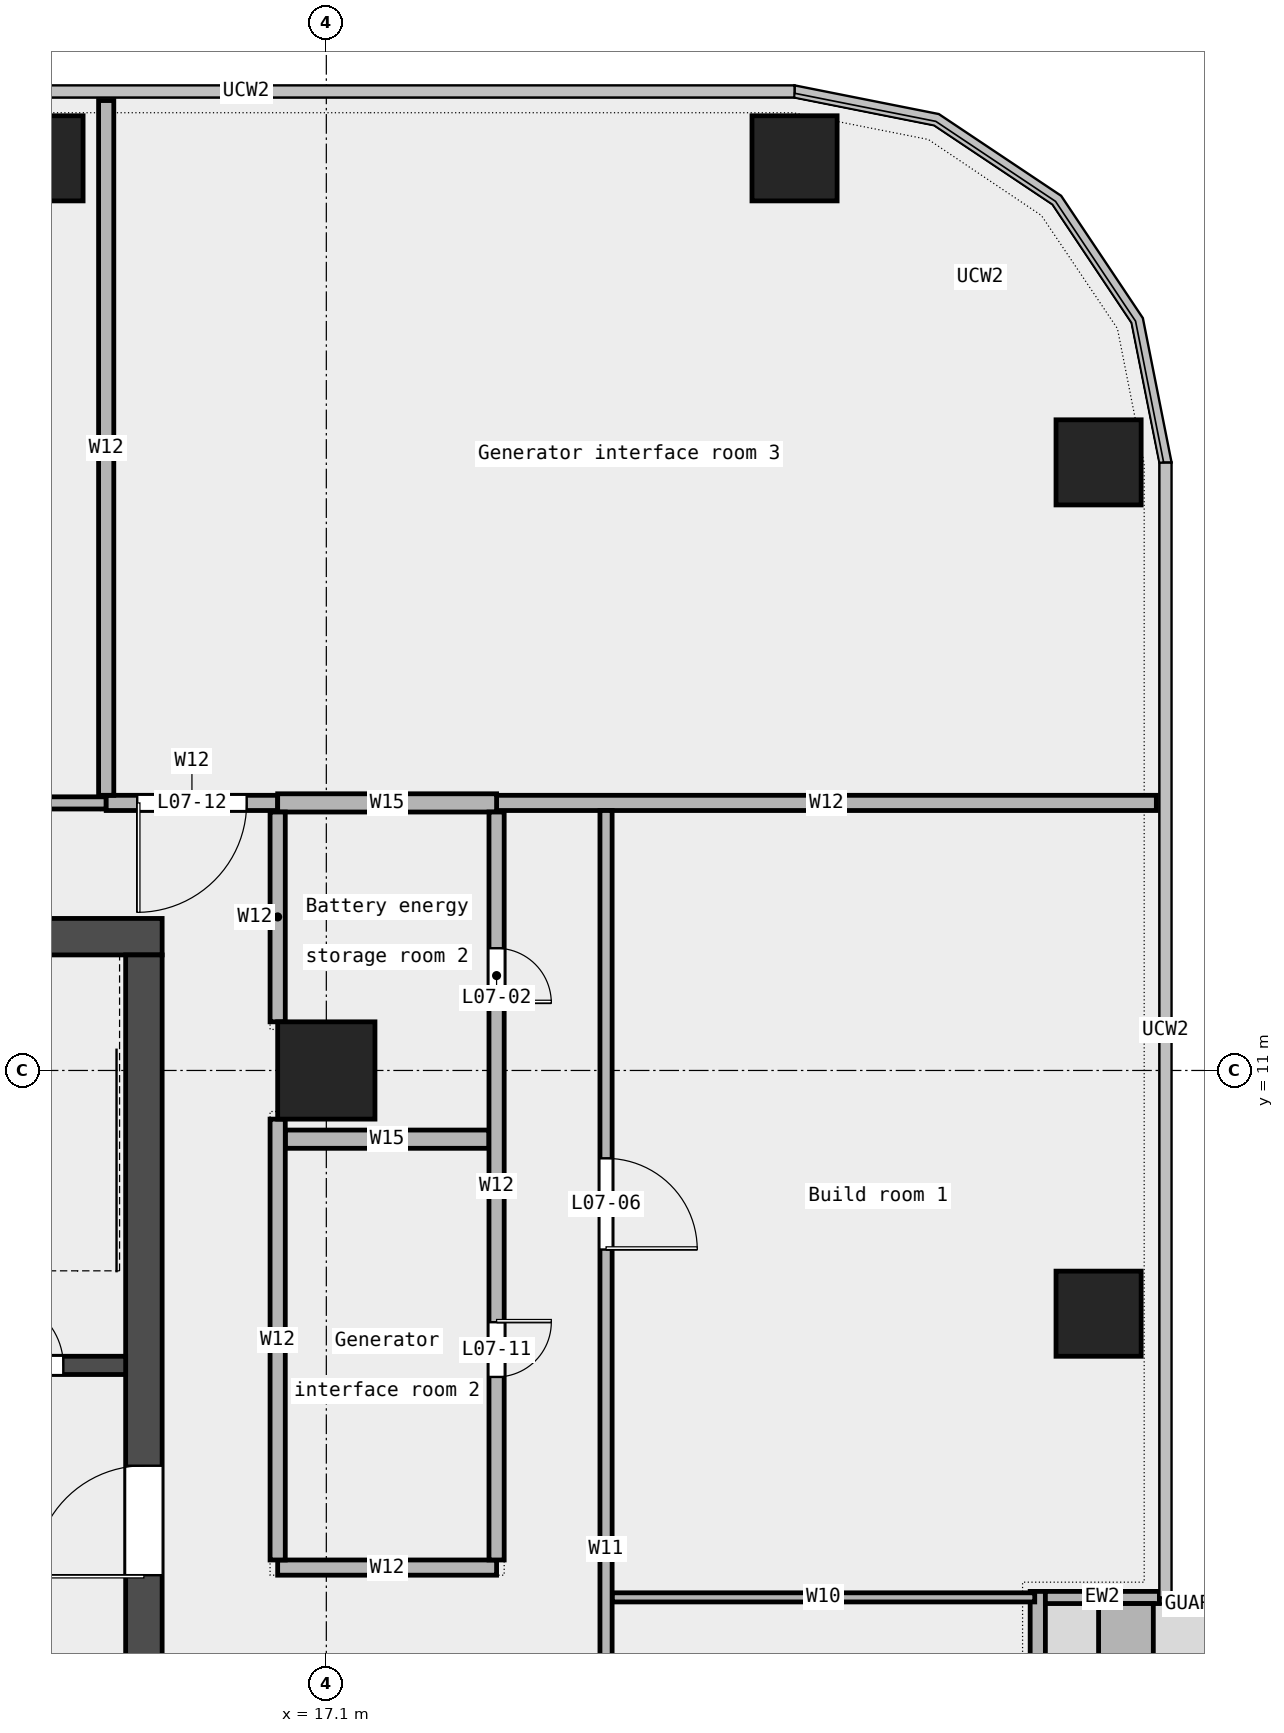
"""IFC4 building model, lengths in metres.
Left out: names, types, materials, properties, quantities, classifications, styles, units other than length and angle.
Written with IfcOpenShell. Run it as: python <this file> out.ifc"""

import sys

from ifc_helpers import new_model, si_unit, direction, frame, frame_2d, origin, origin_2d, place, context, subcontext, project, spatial, rectangle, extrude, element, fill, save


model = new_model("IFC4")
c1 = context("Model", 3, precision=1e-05, world=origin(), true_north=direction((0.0, 1.0)))
c2 = subcontext(c1, "Body", "Model", "MODEL_VIEW")
j1 = project(units=[si_unit("LENGTHUNIT", "METRE"), si_unit("PLANEANGLEUNIT", "RADIAN")], contexts=[c1])
p1 = place(None, origin())
s1 = spatial("IfcSite", under=j1, at=p1, CompositionType="ELEMENT")
p2 = place(p1, origin())
s2 = spatial("IfcBuilding", under=s1, at=p2, CompositionType="ELEMENT")
p3 = place(p2, frame((0.0, 0.0, 40.6)))
s3 = spatial("IfcBuildingStorey", under=s2, at=p3, CompositionType="ELEMENT", Elevation=40.6)
for number, where, z_axis, x_axis in (
    (1, (29.8, 7.0, 0.0), (0.0, 0.0, 1.0), (1.0, 0.0, 0.0)),
    (2, (29.8, 21.0, 0.0), (0.0, 0.0, 1.0), (1.0, 0.0, 0.0)),
    (3, (24.8, 26.0, 0.0), (0.0, 0.0, 1.0), (1.0, 0.0, 0.0)),
    (4, (12.4, 26.0, 0.0), (0.0, 0.0, 1.0), (1.0, 0.0, 0.0)),
):
    element("IfcColumn", number, at=place(p3, frame(where, z_axis=z_axis, x_axis=x_axis)), inside=s3, PredefinedType="COLUMN", context=c2, shape_type="SweptSolid", body=[
        extrude(rectangle(XDim=1.4, YDim=1.4, at=origin_2d()), origin(), (0.0, 0.0, 1.0), 4.35),
    ])
p4 = place(p3, frame((17.1, 11.0, 0.0), z_axis=(0.0, 0.0, 1.0), x_axis=(1.0, 0.0, 0.0)))
e5 = element("IfcColumn", 5, at=p4, inside=s3, PredefinedType="COLUMN", context=c2, shape_type="SweptSolid", body=[
    extrude(rectangle(XDim=1.6, YDim=1.6, at=origin_2d()), origin(), (0.0, 0.0, 1.0), 4.35),
])
p5 = place(p3, frame((28.8, -11.767, 0.0), z_axis=(0.0, 0.0, 1.0), x_axis=(0.0, 1.0, 0.0)))
e6 = element("IfcWall", 6, at=p5, inside=s3, PredefinedType="STANDARD", context=c2, shape_type="SweptSolid", body=[
    extrude(rectangle(XDim=14.2, YDim=0.25, at=frame_2d((7.1, 0.0))), origin(), (0.0, 0.0, 1.0), 4.35),
])
p6 = place(p5, frame((1.75, 0.0, 0.45)))
e7 = element("IfcOpeningElement", 7, at=p6, cuts=e6, PredefinedType="OPENING", context=c2, shape_type="SweptSolid", body=[
    extrude(rectangle(XDim=1.5, YDim=3.0, at=frame_2d((0.75, 1.5))), frame((0.0, 0.137, 0.0), z_axis=(0.0, -1.0, 0.0), x_axis=(1.0, 0.0, 0.0)), (0.0, 0.0, 1.0), 0.274),
])
p7 = place(p5, frame((6.25, 0.0, 0.0)))
e8 = element("IfcOpeningElement", 8, at=p7, cuts=e6, PredefinedType="OPENING", context=c2, shape_type="SweptSolid", body=[
    extrude(rectangle(XDim=1.8, YDim=2.4, at=frame_2d((0.9, 1.2))), frame((0.0, 0.137, 0.0), z_axis=(0.0, -1.0, 0.0), x_axis=(1.0, 0.0, 0.0)), (0.0, 0.0, 1.0), 0.274),
])
p8 = place(p5, frame((11.0, 0.0, 0.45)))
e9 = element("IfcOpeningElement", 9, at=p8, cuts=e6, PredefinedType="OPENING", context=c2, shape_type="SweptSolid", body=[
    extrude(rectangle(XDim=1.5, YDim=3.0, at=frame_2d((0.75, 1.5))), frame((0.0, 0.137, 0.0), z_axis=(0.0, -1.0, 0.0), x_axis=(1.0, 0.0, 0.0)), (0.0, 0.0, 1.0), 0.274),
])
p9 = place(p3, frame((30.8, 2.333, 0.0), z_axis=(0.0, 0.0, 1.0), x_axis=(-1.0, 0.0, 0.0)))
e10 = element("IfcWall", 10, at=p9, inside=s3, PredefinedType="STANDARD", context=c2, shape_type="SweptSolid", body=[
    extrude(rectangle(XDim=1.875, YDim=0.2, at=frame_2d((0.938, 0.0))), origin(), (0.0, 0.0, 1.0), 4.35),
])
p10 = place(p3, frame((30.25, -1.367, 0.0), z_axis=(0.0, 0.0, 1.0), x_axis=(0.0, 1.0, 0.0)))
e11 = element("IfcWall", 11, at=p10, inside=s3, PredefinedType="STANDARD", context=c2, shape_type="SweptSolid", body=[
    extrude(rectangle(XDim=3.6, YDim=0.9, at=frame_2d((1.8, 0.0))), origin(), (0.0, 0.0, 1.0), 0.7),
])
p11 = place(p3, frame((21.8, 2.335, 0.0), z_axis=(0.0, 0.0, 1.0), x_axis=(1.0, 0.0, 0.0)))
e12 = element("IfcWall", 12, at=p11, inside=s3, PredefinedType="PARTITIONING", context=c2, shape_type="SweptSolid", body=[
    extrude(rectangle(XDim=6.95, YDim=0.15, at=frame_2d((3.475, 0.0))), origin(), (0.0, 0.0, 1.0), 4.35),
])
p12 = place(p3, frame((16.3, 2.825, 0.0), z_axis=(0.0, 0.0, 1.0), x_axis=(1.0, 0.0, 0.0)))
e13 = element("IfcWall", 13, at=p12, inside=s3, PredefinedType="PARTITIONING", context=c2, shape_type="SweptSolid", body=[
    extrude(rectangle(XDim=3.6, YDim=0.25, at=frame_2d((1.8, 0.0))), origin(), (0.0, 0.0, 1.0), 4.35),
])
p13 = place(p3, frame((16.425, 9.87, 0.0), z_axis=(0.0, 0.0, 1.0), x_axis=(1.0, 0.0, 0.0)))
e14 = element("IfcWall", 14, at=p13, inside=s3, PredefinedType="PARTITIONING", context=c2, shape_type="SweptSolid", body=[
    extrude(rectangle(XDim=3.35, YDim=0.3, at=frame_2d((1.675, 0.0))), origin(), (0.0, 0.0, 1.0), 4.35),
])
p14 = place(p3, frame((-6.765, 15.4, 0.0), z_axis=(0.0, 0.0, 1.0), x_axis=(1.0, 0.0, 0.0)))
e15 = element("IfcWall", 15, at=p14, inside=s3, PredefinedType="PARTITIONING", context=c2, shape_type="SweptSolid", body=[
    extrude(rectangle(XDim=20.245, YDim=0.2, at=frame_2d((10.123, 0.0))), origin(), (0.0, 0.0, 1.0), 4.35),
])
p15 = place(p14, frame((6.015, 0.0, 0.0)))
e16 = element("IfcOpeningElement", 16, at=p15, cuts=e15, PredefinedType="OPENING", context=c2, shape_type="SweptSolid", body=[
    extrude(rectangle(XDim=1.5, YDim=2.1, at=frame_2d((0.75, 1.05))), frame((0.0, 0.112, 0.0), z_axis=(0.0, -1.0, 0.0), x_axis=(1.0, 0.0, 0.0)), (0.0, 0.0, 1.0), 0.224),
])
p16 = place(p14, frame((16.288, 0.0, 0.0)))
e17 = element("IfcOpeningElement", 17, at=p16, cuts=e15, PredefinedType="OPENING", context=c2, shape_type="SweptSolid", body=[
    extrude(rectangle(XDim=1.2, YDim=2.1, at=frame_2d((0.6, 1.05))), frame((0.0, 0.112, 0.0), z_axis=(0.0, -1.0, 0.0), x_axis=(1.0, 0.0, 0.0)), (0.0, 0.0, 1.0), 0.224),
])
p17 = place(p3, frame((13.48, 15.4, 0.0), z_axis=(0.0, 0.0, 1.0), x_axis=(1.0, 0.0, 0.0)))
e18 = element("IfcWall", 18, at=p17, inside=s3, PredefinedType="PARTITIONING", context=c2, shape_type="SweptSolid", body=[
    extrude(rectangle(XDim=2.82, YDim=0.25, at=frame_2d((1.41, 0.0))), origin(), (0.0, 0.0, 1.0), 4.35),
])
p18 = place(p17, frame((0.51, 0.0, 0.0)))
e19 = element("IfcOpeningElement", 19, at=p18, cuts=e18, PredefinedType="OPENING", context=c2, shape_type="SweptSolid", body=[
    extrude(rectangle(XDim=1.8, YDim=2.1, at=frame_2d((0.9, 1.05))), frame((0.0, 0.137, 0.0), z_axis=(0.0, -1.0, 0.0), x_axis=(1.0, 0.0, 0.0)), (0.0, 0.0, 1.0), 0.274),
])
p19 = place(p3, frame((19.9, 15.4, 0.0), z_axis=(0.0, 0.0, 1.0), x_axis=(1.0, 0.0, 0.0)))
e20 = element("IfcWall", 20, at=p19, inside=s3, PredefinedType="PARTITIONING", context=c2, shape_type="SweptSolid", body=[
    extrude(rectangle(XDim=10.85, YDim=0.25, at=frame_2d((5.425, 0.0))), origin(), (0.0, 0.0, 1.0), 4.35),
])
p20 = place(p3, frame((16.3, 15.4, 0.0), z_axis=(0.0, 0.0, 1.0), x_axis=(1.0, 0.0, 0.0)))
e21 = element("IfcWall", 21, at=p20, inside=s3, PredefinedType="PARTITIONING", context=c2, shape_type="SweptSolid", body=[
    extrude(rectangle(XDim=3.6, YDim=0.3, at=frame_2d((1.8, 0.0))), origin(), (0.0, 0.0, 1.0), 4.35),
])
p21 = place(p3, frame((13.48, 15.525, 0.0), z_axis=(0.0, 0.0, 1.0), x_axis=(0.0, 1.0, 0.0)))
e22 = element("IfcWall", 22, at=p21, inside=s3, PredefinedType="PARTITIONING", context=c2, shape_type="SweptSolid", body=[
    extrude(rectangle(XDim=11.425, YDim=0.25, at=frame_2d((5.712, 0.0))), origin(), (0.0, 0.0, 1.0), 4.35),
])
p22 = place(p3, frame((16.3, 2.95, 0.0), z_axis=(0.0, 0.0, 1.0), x_axis=(0.0, 1.0, 0.0)))
e23 = element("IfcWall", 23, at=p22, inside=s3, PredefinedType="PARTITIONING", context=c2, shape_type="SweptSolid", body=[
    extrude(rectangle(XDim=7.25, YDim=0.25, at=frame_2d((3.625, 0.0))), origin(), (0.0, 0.0, 1.0), 4.35),
])
p23 = place(p3, frame((16.3, 11.8, 0.0), z_axis=(0.0, 0.0, 1.0), x_axis=(0.0, 1.0, 0.0)))
e24 = element("IfcWall", 24, at=p23, inside=s3, PredefinedType="PARTITIONING", context=c2, shape_type="SweptSolid", body=[
    extrude(rectangle(XDim=3.45, YDim=0.25, at=frame_2d((1.725, 0.0))), origin(), (0.0, 0.0, 1.0), 4.35),
])
p24 = place(p3, frame((19.9, 2.95, 0.0), z_axis=(0.0, 0.0, 1.0), x_axis=(0.0, 1.0, 0.0)))
e25 = element("IfcWall", 25, at=p24, inside=s3, PredefinedType="PARTITIONING", context=c2, shape_type="SweptSolid", body=[
    extrude(rectangle(XDim=12.3, YDim=0.25, at=frame_2d((6.15, 0.0))), origin(), (0.0, 0.0, 1.0), 4.35),
])
p25 = place(p24, frame((9.16, 0.0, 0.0)))
e26 = element("IfcOpeningElement", 26, at=p25, cuts=e25, PredefinedType="OPENING", context=c2, shape_type="SweptSolid", body=[
    extrude(rectangle(XDim=0.9, YDim=2.1, at=frame_2d((0.45, 1.05))), frame((0.0, 0.137, 0.0), z_axis=(0.0, -1.0, 0.0), x_axis=(1.0, 0.0, 0.0)), (0.0, 0.0, 1.0), 0.274),
])
p26 = place(p24, frame((3.01, 0.0, 0.0)))
e27 = element("IfcOpeningElement", 27, at=p26, cuts=e25, PredefinedType="OPENING", context=c2, shape_type="SweptSolid", body=[
    extrude(rectangle(XDim=0.9, YDim=2.1, at=frame_2d((0.45, 1.05))), frame((0.0, 0.137, 0.0), z_axis=(0.0, -1.0, 0.0), x_axis=(1.0, 0.0, 0.0)), (0.0, 0.0, 1.0), 0.274),
])
p27 = place(p3, frame((21.7, -9.0, 0.0), z_axis=(0.0, 0.0, 1.0), x_axis=(0.0, 1.0, 0.0)))
e28 = element("IfcWall", 28, at=p27, inside=s3, PredefinedType="PARTITIONING", context=c2, shape_type="SweptSolid", body=[
    extrude(rectangle(XDim=24.275, YDim=0.2, at=frame_2d((12.137, 0.0))), origin(), (0.0, 0.0, 1.0), 4.35),
])
p28 = place(p27, frame((4.768, 0.0, 0.0)))
e29 = element("IfcOpeningElement", 29, at=p28, cuts=e28, PredefinedType="OPENING", context=c2, shape_type="SweptSolid", body=[
    extrude(rectangle(XDim=1.8, YDim=2.1, at=frame_2d((0.9, 1.05))), frame((0.0, 0.112, 0.0), z_axis=(0.0, -1.0, 0.0), x_axis=(1.0, 0.0, 0.0)), (0.0, 0.0, 1.0), 0.224),
])
p29 = place(p27, frame((17.055, 0.0, 0.0)))
e30 = element("IfcOpeningElement", 30, at=p29, cuts=e28, PredefinedType="OPENING", context=c2, shape_type="SweptSolid", body=[
    extrude(rectangle(XDim=1.5, YDim=2.1, at=frame_2d((0.75, 1.05))), frame((0.0, 0.112, 0.0), z_axis=(0.0, -1.0, 0.0), x_axis=(1.0, 0.0, 0.0)), (0.0, 0.0, 1.0), 0.224),
])
p30 = place(p3, frame((-14.4, 13.2, 0.0), z_axis=(0.0, 0.0, 1.0), x_axis=(1.0, 0.0, 0.0)))
e31 = element("IfcWall", 31, at=p30, inside=s3, PredefinedType="SHEAR", context=c2, shape_type="SweptSolid", body=[
    extrude(rectangle(XDim=28.8, YDim=0.6, at=frame_2d((14.4, 0.0))), origin(), (0.0, 0.0, 1.0), 4.5),
])
p31 = place(p30, frame((6.4, 0.0, 0.0)))
e32 = element("IfcOpeningElement", 32, at=p31, cuts=e31, PredefinedType="OPENING", context=c2, shape_type="SweptSolid", body=[
    extrude(rectangle(XDim=1.0, YDim=2.1, at=frame_2d((0.5, 1.05))), frame((0.0, 0.312, 0.0), z_axis=(0.0, -1.0, 0.0), x_axis=(1.0, 0.0, 0.0)), (0.0, 0.0, 1.0), 0.624),
])
p32 = place(p30, frame((11.462, 0.0, 0.0)))
e33 = element("IfcOpeningElement", 33, at=p32, cuts=e31, PredefinedType="OPENING", context=c2, shape_type="SweptSolid", body=[
    extrude(rectangle(XDim=1.0, YDim=2.1, at=frame_2d((0.5, 1.05))), frame((0.0, 0.312, 0.0), z_axis=(0.0, -1.0, 0.0), x_axis=(1.0, 0.0, 0.0)), (0.0, 0.0, 1.0), 0.624),
])
p33 = place(p30, frame((16.337, 0.0, 0.0)))
e34 = element("IfcOpeningElement", 34, at=p33, cuts=e31, PredefinedType="OPENING", context=c2, shape_type="SweptSolid", body=[
    extrude(rectangle(XDim=1.0, YDim=2.1, at=frame_2d((0.5, 1.05))), frame((0.0, 0.312, 0.0), z_axis=(0.0, -1.0, 0.0), x_axis=(1.0, 0.0, 0.0)), (0.0, 0.0, 1.0), 0.624),
])
p34 = place(p30, frame((21.775, 0.0, 0.0)))
e35 = element("IfcOpeningElement", 35, at=p34, cuts=e31, PredefinedType="OPENING", context=c2, shape_type="SweptSolid", body=[
    extrude(rectangle(XDim=1.0, YDim=2.1, at=frame_2d((0.5, 1.05))), frame((0.0, 0.312, 0.0), z_axis=(0.0, -1.0, 0.0), x_axis=(1.0, 0.0, 0.0)), (0.0, 0.0, 1.0), 0.624),
])
p35 = place(p3, frame((14.1, -6.6, 0.0), z_axis=(0.0, 0.0, 1.0), x_axis=(0.0, 1.0, 0.0)))
e36 = element("IfcWall", 36, at=p35, inside=s3, PredefinedType="SHEAR", context=c2, shape_type="SweptSolid", body=[
    extrude(rectangle(XDim=19.5, YDim=0.6, at=frame_2d((9.75, 0.0))), origin(), (0.0, 0.0, 1.0), 4.5),
])
p36 = place(p35, frame((9.3, 0.0, 0.0)))
e37 = element("IfcOpeningElement", 37, at=p36, cuts=e36, PredefinedType="OPENING", context=c2, shape_type="SweptSolid", body=[
    extrude(rectangle(XDim=1.8, YDim=2.1, at=frame_2d((0.9, 1.05))), frame((0.0, 0.312, 0.0), z_axis=(0.0, -1.0, 0.0), x_axis=(1.0, 0.0, 0.0)), (0.0, 0.0, 1.0), 0.624),
])
p37 = place(p3, frame((10.65, 6.15, 0.0), z_axis=(0.0, 0.0, 1.0), x_axis=(1.0, 0.0, 0.0)))
e38 = element("IfcWall", 38, at=p37, inside=s3, PredefinedType="SOLIDWALL", context=c2, shape_type="SweptSolid", body=[
    extrude(rectangle(XDim=3.15, YDim=0.3, at=frame_2d((1.575, 0.0))), origin(), (0.0, 0.0, 1.0), 4.5),
])
p38 = place(p37, frame((1.025, 0.0, 0.0)))
e39 = element("IfcOpeningElement", 39, at=p38, cuts=e38, PredefinedType="OPENING", context=c2, shape_type="SweptSolid", body=[
    extrude(rectangle(XDim=1.1, YDim=2.1, at=frame_2d((0.55, 1.05))), frame((0.0, 0.162, 0.0), z_axis=(0.0, -1.0, 0.0), x_axis=(1.0, 0.0, 0.0)), (0.0, 0.0, 1.0), 0.324),
])
p39 = place(p25, origin())
e40 = element("IfcDoor", 40, at=p39, inside=s3, OperationType="SINGLE_SWING_RIGHT", PredefinedType="DOOR", context=c2, shape_type="SweptSolid", body=[
    extrude(rectangle(XDim=0.9, YDim=2.1, at=frame_2d((0.45, 1.05))), frame((0.0, 0.025, 0.0), z_axis=(0.0, -1.0, 0.0), x_axis=(1.0, 0.0, 0.0)), (0.0, 0.0, 1.0), 0.05),
])
fill(e26, e40)
p40 = place(p29, origin())
e41 = element("IfcDoor", 41, at=p40, inside=s3, OperationType="DOUBLE_DOOR_SINGLE_SWING", PredefinedType="DOOR", context=c2, shape_type="SweptSolid", body=[
    extrude(rectangle(XDim=1.5, YDim=2.1, at=frame_2d((0.75, 1.05))), frame((0.0, 0.025, 0.0), z_axis=(0.0, -1.0, 0.0), x_axis=(1.0, 0.0, 0.0)), (0.0, 0.0, 1.0), 0.05),
])
fill(e30, e41)
p41 = place(p26, origin())
e42 = element("IfcDoor", 42, at=p41, inside=s3, OperationType="SINGLE_SWING_LEFT", PredefinedType="DOOR", context=c2, shape_type="SweptSolid", body=[
    extrude(rectangle(XDim=0.9, YDim=2.1, at=frame_2d((0.45, 1.05))), frame((0.0, 0.025, 0.0), z_axis=(0.0, -1.0, 0.0), x_axis=(1.0, 0.0, 0.0)), (0.0, 0.0, 1.0), 0.05),
])
fill(e27, e42)
p42 = place(p18, origin())
e43 = element("IfcDoor", 43, at=p42, inside=s3, OperationType="DOUBLE_DOOR_SINGLE_SWING", PredefinedType="DOOR", context=c2, shape_type="SweptSolid", body=[
    extrude(rectangle(XDim=1.8, YDim=2.1, at=frame_2d((0.9, 1.05))), frame((0.0, 0.025, 0.0), z_axis=(0.0, -1.0, 0.0), x_axis=(1.0, 0.0, 0.0)), (0.0, 0.0, 1.0), 0.05),
])
fill(e19, e43)
p43 = place(p38, origin())
e44 = element("IfcDoor", 44, at=p43, inside=s3, OperationType="SINGLE_SWING_RIGHT", PredefinedType="DOOR", context=c2, shape_type="SweptSolid", body=[
    extrude(rectangle(XDim=1.1, YDim=2.1, at=frame_2d((0.55, 1.05))), frame((0.0, 0.025, 0.0), z_axis=(0.0, -1.0, 0.0), x_axis=(1.0, 0.0, 0.0)), (0.0, 0.0, 1.0), 0.05),
])
fill(e39, e44)
p44 = place(p36, origin())
e45 = element("IfcDoor", 45, at=p44, inside=s3, OperationType="DOUBLE_DOOR_SINGLE_SWING", PredefinedType="DOOR", context=c2, shape_type="SweptSolid", body=[
    extrude(rectangle(XDim=1.8, YDim=2.1, at=frame_2d((0.9, 1.05))), frame((0.0, 0.025, 0.0), z_axis=(0.0, -1.0, 0.0), x_axis=(1.0, 0.0, 0.0)), (0.0, 0.0, 1.0), 0.05),
])
fill(e37, e45)
save(model, sys.argv[1])
